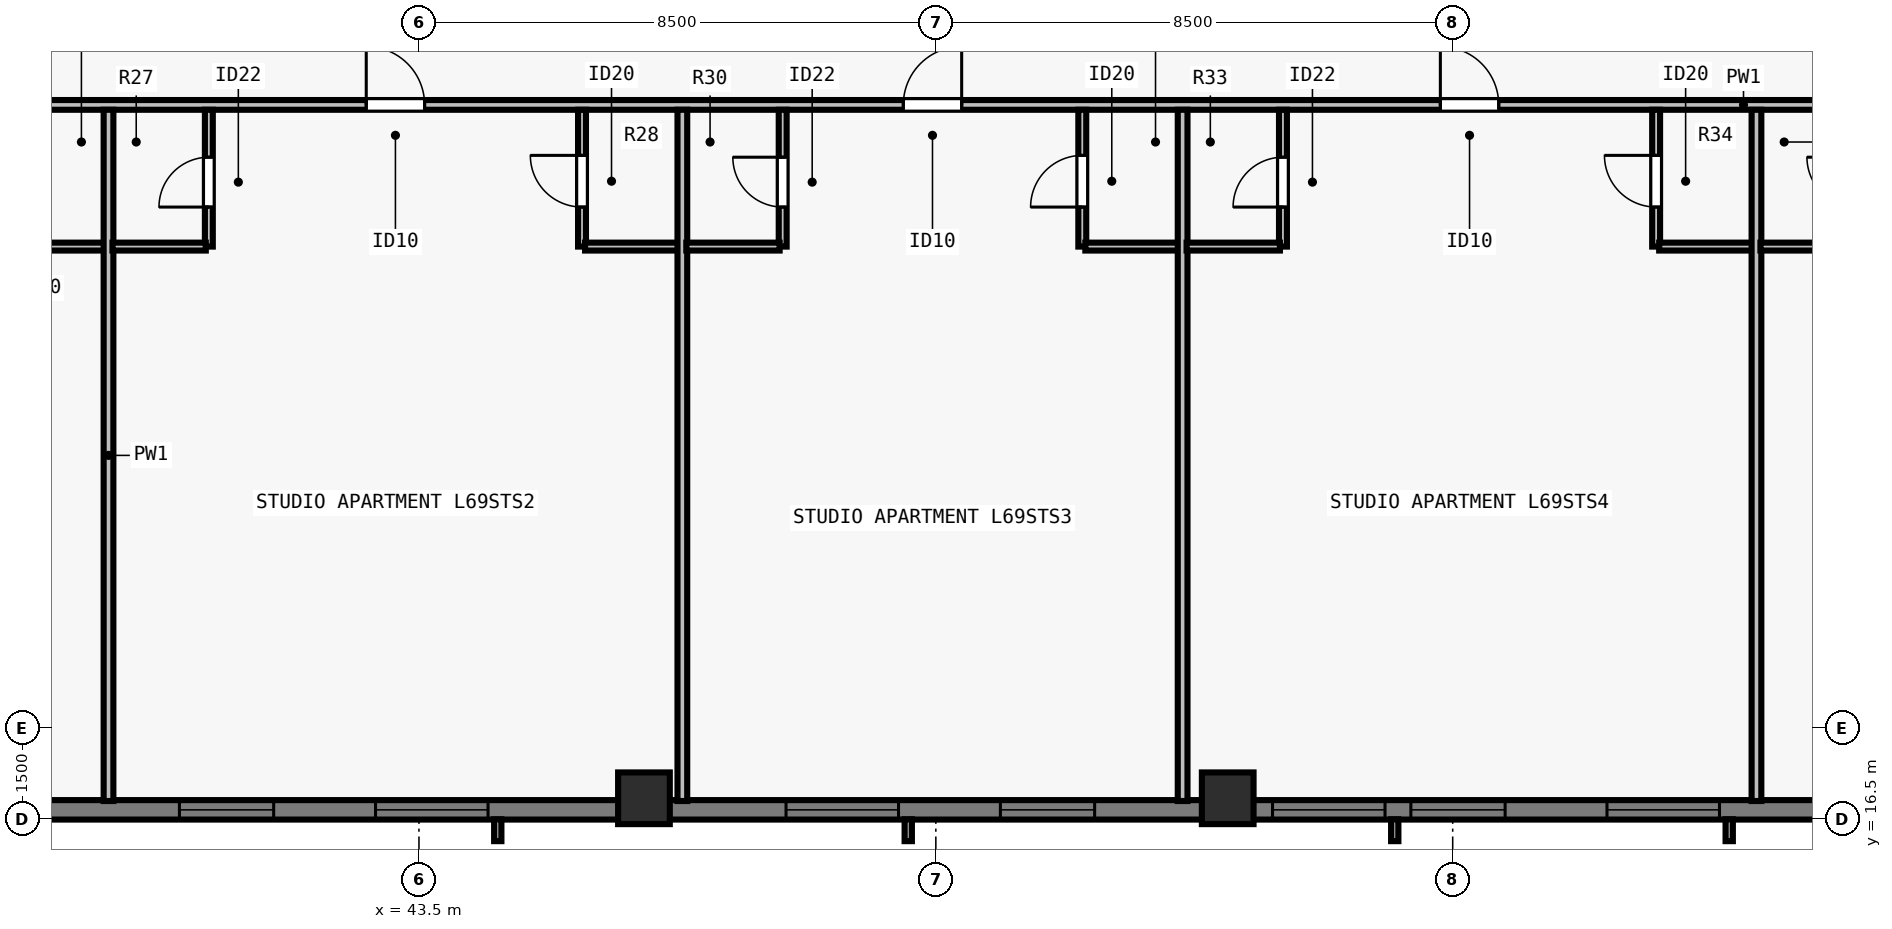
"""IFC4 building model, lengths in metres.
Left out: names, types, materials, properties, quantities, classifications, styles, units other than length and angle.
Written with IfcOpenShell. Run it as: python <this file> out.ifc"""

import sys

from ifc_helpers import new_model, si_unit, direction, frame, frame_2d, origin, origin_2d, place, context, subcontext, project, spatial, rectangle, extrude, element, fill, save


model = new_model("IFC4")
c1 = context("Model", 3, precision=1e-05, world=origin(), true_north=direction((0.0, 1.0)))
c2 = subcontext(c1, "Body", "Model", "MODEL_VIEW")
j1 = project(units=[si_unit("LENGTHUNIT", "METRE"), si_unit("PLANEANGLEUNIT", "RADIAN")], contexts=[c1])
p1 = place(None, origin())
s1 = spatial("IfcSite", under=j1, at=p1, CompositionType="ELEMENT")
p2 = place(p1, origin())
s2 = spatial("IfcBuilding", under=s1, at=p2, CompositionType="ELEMENT")
p3 = place(p2, frame((0.0, 0.0, 251.5)))
s3 = spatial("IfcBuildingStorey", under=s2, at=p3, CompositionType="ELEMENT", Elevation=251.5)
for number, where, z_axis, x_axis in (
    (1, (47.2, 16.85, 0.0), (0.0, 0.0, 1.0), (1.0, 0.0, 0.0)),
    (2, (56.8, 16.85, 0.0), (0.0, 0.0, 1.0), (1.0, 0.0, 0.0)),
):
    element("IfcColumn", number, at=place(p3, frame(where, z_axis=z_axis, x_axis=x_axis)), inside=s3, PredefinedType="COLUMN", context=c2, shape_type="SweptSolid", body=[
        extrude(rectangle(XDim=0.85, YDim=0.85, at=origin_2d()), origin(), (0.0, 0.0, 1.0), 3.5),
    ])
p4 = place(p3, frame((69.5, 16.66, 0.0), z_axis=(0.0, 0.0, 1.0), x_axis=(-1.0, 0.0, 0.0)))
e3 = element("IfcWall", 3, at=p4, inside=s3, PredefinedType="SOLIDWALL", context=c2, shape_type="SweptSolid", body=[
    extrude(rectangle(XDim=34.702, YDim=0.32, at=frame_2d((17.351, 0.0))), origin(), (0.0, 0.0, 1.0), 3.29),
])
p5 = place(p4, frame((4.613, 0.0, 0.8)))
e4 = element("IfcOpeningElement", 4, at=p5, cuts=e3, PredefinedType="OPENING", context=c2, shape_type="SweptSolid", body=[
    extrude(rectangle(XDim=1.85, YDim=1.678, at=frame_2d((0.925, 0.839))), frame((0.0, 0.17, 0.0), z_axis=(0.0, -1.0, 0.0), x_axis=(1.0, 0.0, 0.0)), (0.0, 0.0, 1.0), 0.34),
])
p6 = place(p4, frame((8.138, 0.0, 0.8)))
e5 = element("IfcOpeningElement", 5, at=p6, cuts=e3, PredefinedType="OPENING", context=c2, shape_type="SweptSolid", body=[
    extrude(rectangle(XDim=1.55, YDim=1.678, at=frame_2d((0.775, 0.839))), frame((0.0, 0.17, 0.0), z_axis=(0.0, -1.0, 0.0), x_axis=(1.0, 0.0, 0.0)), (0.0, 0.0, 1.0), 0.34),
])
p7 = place(p4, frame((10.113, 0.0, 0.8)))
e6 = element("IfcOpeningElement", 6, at=p7, cuts=e3, PredefinedType="OPENING", context=c2, shape_type="SweptSolid", body=[
    extrude(rectangle(XDim=1.85, YDim=1.678, at=frame_2d((0.925, 0.839))), frame((0.0, 0.17, 0.0), z_axis=(0.0, -1.0, 0.0), x_axis=(1.0, 0.0, 0.0)), (0.0, 0.0, 1.0), 0.34),
])
p8 = place(p4, frame((14.888, 0.0, 0.8)))
e7 = element("IfcOpeningElement", 7, at=p8, cuts=e3, PredefinedType="OPENING", context=c2, shape_type="SweptSolid", body=[
    extrude(rectangle(XDim=1.55, YDim=1.678, at=frame_2d((0.775, 0.839))), frame((0.0, 0.17, 0.0), z_axis=(0.0, -1.0, 0.0), x_axis=(1.0, 0.0, 0.0)), (0.0, 0.0, 1.0), 0.34),
])
p9 = place(p4, frame((18.114, 0.0, 0.8)))
e8 = element("IfcOpeningElement", 8, at=p9, cuts=e3, PredefinedType="OPENING", context=c2, shape_type="SweptSolid", body=[
    extrude(rectangle(XDim=1.85, YDim=1.678, at=frame_2d((0.925, 0.839))), frame((0.0, 0.17, 0.0), z_axis=(0.0, -1.0, 0.0), x_axis=(1.0, 0.0, 0.0)), (0.0, 0.0, 1.0), 0.34),
])
p10 = place(p4, frame((24.864, 0.0, 0.8)))
e9 = element("IfcOpeningElement", 9, at=p10, cuts=e3, PredefinedType="OPENING", context=c2, shape_type="SweptSolid", body=[
    extrude(rectangle(XDim=1.85, YDim=1.678, at=frame_2d((0.925, 0.839))), frame((0.0, 0.17, 0.0), z_axis=(0.0, -1.0, 0.0), x_axis=(1.0, 0.0, 0.0)), (0.0, 0.0, 1.0), 0.34),
])
p11 = place(p4, frame((28.389, 0.0, 0.8)))
e10 = element("IfcOpeningElement", 10, at=p11, cuts=e3, PredefinedType="OPENING", context=c2, shape_type="SweptSolid", body=[
    extrude(rectangle(XDim=1.55, YDim=1.678, at=frame_2d((0.775, 0.839))), frame((0.0, 0.17, 0.0), z_axis=(0.0, -1.0, 0.0), x_axis=(1.0, 0.0, 0.0)), (0.0, 0.0, 1.0), 0.34),
])
p12 = place(p3, frame((29.915, 28.252, 0.0), z_axis=(0.0, 0.0, 1.0), x_axis=(1.0, 0.0, 0.0)))
e11 = element("IfcWall", 11, at=p12, inside=s3, PredefinedType="PARTITIONING", context=c2, shape_type="SweptSolid", body=[
    extrude(rectangle(XDim=44.28, YDim=0.16, at=frame_2d((22.14, 0.0))), origin(), (0.0, 0.0, 1.0), 2.958),
])
p13 = place(p12, frame((5.002, 0.0, 0.0)))
e12 = element("IfcOpeningElement", 12, at=p13, cuts=e11, PredefinedType="OPENING", context=c2, shape_type="SweptSolid", body=[
    extrude(rectangle(XDim=0.96, YDim=2.18, at=frame_2d((0.48, 1.09))), frame((0.0, 0.09, 0.0), z_axis=(0.0, -1.0, 0.0), x_axis=(1.0, 0.0, 0.0)), (0.0, 0.0, 1.0), 0.18),
])
p14 = place(p12, frame((12.718, 0.0, 0.0)))
e13 = element("IfcOpeningElement", 13, at=p14, cuts=e11, PredefinedType="OPENING", context=c2, shape_type="SweptSolid", body=[
    extrude(rectangle(XDim=0.96, YDim=2.18, at=frame_2d((0.48, 1.09))), frame((0.0, 0.09, 0.0), z_axis=(0.0, -1.0, 0.0), x_axis=(1.0, 0.0, 0.0)), (0.0, 0.0, 1.0), 0.18),
])
p15 = place(p12, frame((21.55, 0.0, 0.0)))
e14 = element("IfcOpeningElement", 14, at=p15, cuts=e11, PredefinedType="OPENING", context=c2, shape_type="SweptSolid", body=[
    extrude(rectangle(XDim=0.96, YDim=2.18, at=frame_2d((0.48, 1.09))), frame((0.0, 0.09, 0.0), z_axis=(0.0, -1.0, 0.0), x_axis=(1.0, 0.0, 0.0)), (0.0, 0.0, 1.0), 0.18),
])
p16 = place(p12, frame((30.382, 0.0, 0.0)))
e15 = element("IfcOpeningElement", 15, at=p16, cuts=e11, PredefinedType="OPENING", context=c2, shape_type="SweptSolid", body=[
    extrude(rectangle(XDim=0.96, YDim=2.18, at=frame_2d((0.48, 1.09))), frame((0.0, 0.09, 0.0), z_axis=(0.0, -1.0, 0.0), x_axis=(1.0, 0.0, 0.0)), (0.0, 0.0, 1.0), 0.18),
])
p17 = place(p12, frame((39.393, 0.0, 0.0)))
e16 = element("IfcOpeningElement", 16, at=p17, cuts=e11, PredefinedType="OPENING", context=c2, shape_type="SweptSolid", body=[
    extrude(rectangle(XDim=0.96, YDim=2.18, at=frame_2d((0.48, 1.09))), frame((0.0, 0.09, 0.0), z_axis=(0.0, -1.0, 0.0), x_axis=(1.0, 0.0, 0.0)), (0.0, 0.0, 1.0), 0.18),
])
p18 = place(p3, frame((36.794, 25.923, 0.0), z_axis=(0.0, 0.0, 1.0), x_axis=(1.0, 0.0, 0.0)))
e17 = element("IfcWall", 17, at=p18, inside=s3, PredefinedType="PLUMBINGWALL", context=c2, shape_type="SweptSolid", body=[
    extrude(rectangle(XDim=1.6, YDim=0.13, at=frame_2d((0.8, 0.0))), origin(), (0.0, 0.0, 1.0), 3.29),
])
p19 = place(p3, frame((38.395, 16.805, 0.0), z_axis=(0.0, 0.0, 1.0), x_axis=(0.0, 1.0, 0.0)))
e18 = element("IfcWall", 18, at=p19, inside=s3, PredefinedType="PARTITIONING", context=c2, shape_type="SweptSolid", body=[
    extrude(rectangle(XDim=11.368, YDim=0.16, at=frame_2d((5.684, 0.0))), origin(), (0.0, 0.0, 1.0), 2.573),
])
p20 = place(p3, frame((40.044, 25.923, 0.0), z_axis=(0.0, 0.0, 1.0), x_axis=(0.0, 1.0, 0.0)))
e19 = element("IfcWall", 19, at=p20, inside=s3, PredefinedType="PLUMBINGWALL", context=c2, shape_type="SweptSolid", body=[
    extrude(rectangle(XDim=2.25, YDim=0.13, at=frame_2d((1.125, 0.0))), origin(), (0.0, 0.0, 1.0), 3.29),
])
p21 = place(p20, frame((0.65, 0.0, 0.0)))
e20 = element("IfcOpeningElement", 20, at=p21, cuts=e19, PredefinedType="OPENING", context=c2, shape_type="SweptSolid", body=[
    extrude(rectangle(XDim=0.82, YDim=2.1, at=frame_2d((0.41, 1.05))), frame((0.0, 0.075, 0.0), z_axis=(0.0, -1.0, 0.0), x_axis=(1.0, 0.0, 0.0)), (0.0, 0.0, 1.0), 0.15),
])
p22 = place(p3, frame((38.459, 25.923, 0.0), z_axis=(0.0, 0.0, 1.0), x_axis=(1.0, 0.0, 0.0)))
e21 = element("IfcWall", 21, at=p22, inside=s3, PredefinedType="PLUMBINGWALL", context=c2, shape_type="SweptSolid", body=[
    extrude(rectangle(XDim=1.535, YDim=0.13, at=frame_2d((0.768, 0.0))), origin(), (0.0, 0.0, 1.0), 3.29),
])
p23 = place(p3, frame((46.181, 25.923, 0.0), z_axis=(0.0, 0.0, 1.0), x_axis=(0.0, 1.0, 0.0)))
e22 = element("IfcWall", 22, at=p23, inside=s3, PredefinedType="PLUMBINGWALL", context=c2, shape_type="SweptSolid", body=[
    extrude(rectangle(XDim=2.25, YDim=0.13, at=frame_2d((1.125, 0.0))), origin(), (0.0, 0.0, 1.0), 3.29),
])
p24 = place(p23, frame((0.65, 0.0, 0.0)))
e23 = element("IfcOpeningElement", 23, at=p24, cuts=e22, PredefinedType="OPENING", context=c2, shape_type="SweptSolid", body=[
    extrude(rectangle(XDim=0.85, YDim=2.1, at=frame_2d((0.425, 1.05))), frame((0.0, 0.075, 0.0), z_axis=(0.0, -1.0, 0.0), x_axis=(1.0, 0.0, 0.0)), (0.0, 0.0, 1.0), 0.15),
])
p25 = place(p3, frame((46.231, 25.923, 0.0), z_axis=(0.0, 0.0, 1.0), x_axis=(1.0, 0.0, 0.0)))
e24 = element("IfcWall", 24, at=p25, inside=s3, PredefinedType="PLUMBINGWALL", context=c2, shape_type="SweptSolid", body=[
    extrude(rectangle(XDim=1.6, YDim=0.13, at=frame_2d((0.8, 0.0))), origin(), (0.0, 0.0, 1.0), 3.29),
])
p26 = place(p3, frame((47.832, 16.805, 0.0), z_axis=(0.0, 0.0, 1.0), x_axis=(0.0, 1.0, 0.0)))
e25 = element("IfcWall", 25, at=p26, inside=s3, PredefinedType="PARTITIONING", context=c2, shape_type="SweptSolid", body=[
    extrude(rectangle(XDim=11.368, YDim=0.16, at=frame_2d((5.684, 0.0))), origin(), (0.0, 0.0, 1.0), 2.958),
])
p27 = place(p3, frame((49.481, 25.923, 0.0), z_axis=(0.0, 0.0, 1.0), x_axis=(0.0, 1.0, 0.0)))
e26 = element("IfcWall", 26, at=p27, inside=s3, PredefinedType="PLUMBINGWALL", context=c2, shape_type="SweptSolid", body=[
    extrude(rectangle(XDim=2.25, YDim=0.13, at=frame_2d((1.125, 0.0))), origin(), (0.0, 0.0, 1.0), 3.29),
])
p28 = place(p27, frame((0.65, 0.0, 0.0)))
e27 = element("IfcOpeningElement", 27, at=p28, cuts=e26, PredefinedType="OPENING", context=c2, shape_type="SweptSolid", body=[
    extrude(rectangle(XDim=0.82, YDim=2.1, at=frame_2d((0.41, 1.05))), frame((0.0, 0.075, 0.0), z_axis=(0.0, -1.0, 0.0), x_axis=(1.0, 0.0, 0.0)), (0.0, 0.0, 1.0), 0.15),
])
p29 = place(p3, frame((47.896, 25.923, 0.0), z_axis=(0.0, 0.0, 1.0), x_axis=(1.0, 0.0, 0.0)))
e28 = element("IfcWall", 28, at=p29, inside=s3, PredefinedType="PLUMBINGWALL", context=c2, shape_type="SweptSolid", body=[
    extrude(rectangle(XDim=1.535, YDim=0.13, at=frame_2d((0.768, 0.0))), origin(), (0.0, 0.0, 1.0), 3.29),
])
p30 = place(p3, frame((54.408, 25.923, 0.0), z_axis=(0.0, 0.0, 1.0), x_axis=(0.0, 1.0, 0.0)))
e29 = element("IfcWall", 29, at=p30, inside=s3, PredefinedType="PLUMBINGWALL", context=c2, shape_type="SweptSolid", body=[
    extrude(rectangle(XDim=2.25, YDim=0.13, at=frame_2d((1.125, 0.0))), origin(), (0.0, 0.0, 1.0), 2.958),
])
p31 = place(p30, frame((0.65, 0.0, 0.0)))
e30 = element("IfcOpeningElement", 30, at=p31, cuts=e29, PredefinedType="OPENING", context=c2, shape_type="SweptSolid", body=[
    extrude(rectangle(XDim=0.85, YDim=2.1, at=frame_2d((0.425, 1.05))), frame((0.0, 0.075, 0.0), z_axis=(0.0, -1.0, 0.0), x_axis=(1.0, 0.0, 0.0)), (0.0, 0.0, 1.0), 0.15),
])
p32 = place(p3, frame((54.458, 25.923, 0.0), z_axis=(0.0, 0.0, 1.0), x_axis=(1.0, 0.0, 0.0)))
e31 = element("IfcWall", 31, at=p32, inside=s3, PredefinedType="PLUMBINGWALL", context=c2, shape_type="SweptSolid", body=[
    extrude(rectangle(XDim=1.6, YDim=0.13, at=frame_2d((0.8, 0.0))), origin(), (0.0, 0.0, 1.0), 3.29),
])
p33 = place(p3, frame((56.059, 16.805, 0.0), z_axis=(0.0, 0.0, 1.0), x_axis=(0.0, 1.0, 0.0)))
e32 = element("IfcWall", 32, at=p33, inside=s3, PredefinedType="PARTITIONING", context=c2, shape_type="SweptSolid", body=[
    extrude(rectangle(XDim=11.368, YDim=0.16, at=frame_2d((5.684, 0.0))), origin(), (0.0, 0.0, 1.0), 3.29),
])
p34 = place(p3, frame((57.708, 25.923, 0.0), z_axis=(0.0, 0.0, 1.0), x_axis=(0.0, 1.0, 0.0)))
e33 = element("IfcWall", 33, at=p34, inside=s3, PredefinedType="PLUMBINGWALL", context=c2, shape_type="SweptSolid", body=[
    extrude(rectangle(XDim=2.25, YDim=0.13, at=frame_2d((1.125, 0.0))), origin(), (0.0, 0.0, 1.0), 3.29),
])
p35 = place(p34, frame((0.65, 0.0, 0.0)))
e34 = element("IfcOpeningElement", 34, at=p35, cuts=e33, PredefinedType="OPENING", context=c2, shape_type="SweptSolid", body=[
    extrude(rectangle(XDim=0.82, YDim=2.1, at=frame_2d((0.41, 1.05))), frame((0.0, 0.075, 0.0), z_axis=(0.0, -1.0, 0.0), x_axis=(1.0, 0.0, 0.0)), (0.0, 0.0, 1.0), 0.15),
])
p36 = place(p3, frame((56.124, 25.923, 0.0), z_axis=(0.0, 0.0, 1.0), x_axis=(1.0, 0.0, 0.0)))
e35 = element("IfcWall", 35, at=p36, inside=s3, PredefinedType="PLUMBINGWALL", context=c2, shape_type="SweptSolid", body=[
    extrude(rectangle(XDim=1.535, YDim=0.13, at=frame_2d((0.768, 0.0))), origin(), (0.0, 0.0, 1.0), 3.29),
])
p37 = place(p3, frame((63.845, 25.923, 0.0), z_axis=(0.0, 0.0, 1.0), x_axis=(0.0, 1.0, 0.0)))
e36 = element("IfcWall", 36, at=p37, inside=s3, PredefinedType="PLUMBINGWALL", context=c2, shape_type="SweptSolid", body=[
    extrude(rectangle(XDim=2.25, YDim=0.13, at=frame_2d((1.125, 0.0))), origin(), (0.0, 0.0, 1.0), 3.29),
])
p38 = place(p37, frame((0.65, 0.0, 0.0)))
e37 = element("IfcOpeningElement", 37, at=p38, cuts=e36, PredefinedType="OPENING", context=c2, shape_type="SweptSolid", body=[
    extrude(rectangle(XDim=0.85, YDim=2.1, at=frame_2d((0.425, 1.05))), frame((0.0, 0.075, 0.0), z_axis=(0.0, -1.0, 0.0), x_axis=(1.0, 0.0, 0.0)), (0.0, 0.0, 1.0), 0.15),
])
p39 = place(p3, frame((63.896, 25.923, 0.0), z_axis=(0.0, 0.0, 1.0), x_axis=(1.0, 0.0, 0.0)))
e38 = element("IfcWall", 38, at=p39, inside=s3, PredefinedType="PLUMBINGWALL", context=c2, shape_type="SweptSolid", body=[
    extrude(rectangle(XDim=1.6, YDim=0.13, at=frame_2d((0.8, 0.0))), origin(), (0.0, 0.0, 1.0), 3.29),
])
p40 = place(p3, frame((65.496, 16.805, 0.0), z_axis=(0.0, 0.0, 1.0), x_axis=(0.0, 1.0, 0.0)))
e39 = element("IfcWall", 39, at=p40, inside=s3, PredefinedType="PARTITIONING", context=c2, shape_type="SweptSolid", body=[
    extrude(rectangle(XDim=11.368, YDim=0.16, at=frame_2d((5.684, 0.0))), origin(), (0.0, 0.0, 1.0), 2.573),
])
p41 = place(p3, frame((65.561, 25.923, 0.0), z_axis=(0.0, 0.0, 1.0), x_axis=(1.0, 0.0, 0.0)))
e40 = element("IfcWall", 40, at=p41, inside=s3, PredefinedType="PLUMBINGWALL", context=c2, shape_type="SweptSolid", body=[
    extrude(rectangle(XDim=1.535, YDim=0.13, at=frame_2d((0.768, 0.0))), origin(), (0.0, 0.0, 1.0), 3.29),
])
p42 = place(p5, origin())
e41 = element("IfcWindow", 41, at=p42, inside=s3, PartitioningType="SINGLE_PANEL", PredefinedType="WINDOW", context=c2, shape_type="SweptSolid", body=[
    extrude(rectangle(XDim=1.85, YDim=1.678, at=frame_2d((0.925, 0.839))), frame((0.0, -0.05, 0.0), z_axis=(0.0, -1.0, 0.0), x_axis=(1.0, 0.0, 0.0)), (0.0, 0.0, 1.0), 0.06),
])
fill(e4, e41)
p43 = place(p6, origin())
e42 = element("IfcWindow", 42, at=p43, inside=s3, PartitioningType="SINGLE_PANEL", PredefinedType="WINDOW", context=c2, shape_type="SweptSolid", body=[
    extrude(rectangle(XDim=1.55, YDim=1.678, at=frame_2d((0.775, 0.839))), frame((0.0, -0.05, 0.0), z_axis=(0.0, -1.0, 0.0), x_axis=(1.0, 0.0, 0.0)), (0.0, 0.0, 1.0), 0.06),
])
fill(e5, e42)
p44 = place(p7, origin())
e43 = element("IfcWindow", 43, at=p44, inside=s3, PartitioningType="SINGLE_PANEL", PredefinedType="WINDOW", context=c2, shape_type="SweptSolid", body=[
    extrude(rectangle(XDim=1.85, YDim=1.678, at=frame_2d((0.925, 0.839))), frame((0.0, -0.05, 0.0), z_axis=(0.0, -1.0, 0.0), x_axis=(1.0, 0.0, 0.0)), (0.0, 0.0, 1.0), 0.06),
])
fill(e6, e43)
p45 = place(p8, origin())
e44 = element("IfcWindow", 44, at=p45, inside=s3, PartitioningType="SINGLE_PANEL", PredefinedType="WINDOW", context=c2, shape_type="SweptSolid", body=[
    extrude(rectangle(XDim=1.55, YDim=1.678, at=frame_2d((0.775, 0.839))), frame((0.0, -0.05, 0.0), z_axis=(0.0, -1.0, 0.0), x_axis=(1.0, 0.0, 0.0)), (0.0, 0.0, 1.0), 0.06),
])
fill(e7, e44)
p46 = place(p9, origin())
e45 = element("IfcWindow", 45, at=p46, inside=s3, PartitioningType="SINGLE_PANEL", PredefinedType="WINDOW", context=c2, shape_type="SweptSolid", body=[
    extrude(rectangle(XDim=1.85, YDim=1.678, at=frame_2d((0.925, 0.839))), frame((0.0, -0.05, 0.0), z_axis=(0.0, -1.0, 0.0), x_axis=(1.0, 0.0, 0.0)), (0.0, 0.0, 1.0), 0.06),
])
fill(e8, e45)
p47 = place(p10, origin())
e46 = element("IfcWindow", 46, at=p47, inside=s3, PartitioningType="SINGLE_PANEL", PredefinedType="WINDOW", context=c2, shape_type="SweptSolid", body=[
    extrude(rectangle(XDim=1.85, YDim=1.678, at=frame_2d((0.925, 0.839))), frame((0.0, -0.05, 0.0), z_axis=(0.0, -1.0, 0.0), x_axis=(1.0, 0.0, 0.0)), (0.0, 0.0, 1.0), 0.06),
])
fill(e9, e46)
p48 = place(p11, origin())
e47 = element("IfcWindow", 47, at=p48, inside=s3, PartitioningType="SINGLE_PANEL", PredefinedType="WINDOW", context=c2, shape_type="SweptSolid", body=[
    extrude(rectangle(XDim=1.55, YDim=1.678, at=frame_2d((0.775, 0.839))), frame((0.0, -0.05, 0.0), z_axis=(0.0, -1.0, 0.0), x_axis=(1.0, 0.0, 0.0)), (0.0, 0.0, 1.0), 0.06),
])
fill(e10, e47)
p49 = place(p21, origin())
e48 = element("IfcDoor", 48, at=p49, inside=s3, OperationType="SINGLE_SWING_LEFT", PredefinedType="DOOR", context=c2, shape_type="SweptSolid", body=[
    extrude(rectangle(XDim=0.82, YDim=2.1, at=frame_2d((0.41, 1.05))), frame((0.0, 0.025, 0.0), z_axis=(0.0, -1.0, 0.0), x_axis=(1.0, 0.0, 0.0)), (0.0, 0.0, 1.0), 0.05),
])
fill(e20, e48)
p50 = place(p24, origin())
e49 = element("IfcDoor", 49, at=p50, inside=s3, OperationType="SINGLE_SWING_RIGHT", PredefinedType="DOOR", context=c2, shape_type="SweptSolid", body=[
    extrude(rectangle(XDim=0.85, YDim=2.1, at=frame_2d((0.425, 1.05))), frame((0.0, 0.025, 0.0), z_axis=(0.0, -1.0, 0.0), x_axis=(1.0, 0.0, 0.0)), (0.0, 0.0, 1.0), 0.05),
])
fill(e23, e49)
p51 = place(p14, origin())
e50 = element("IfcDoor", 50, at=p51, inside=s3, OperationType="SINGLE_SWING_LEFT", PredefinedType="DOOR", context=c2, shape_type="SweptSolid", body=[
    extrude(rectangle(XDim=0.96, YDim=2.18, at=frame_2d((0.48, 1.09))), frame((0.0, 0.025, 0.0), z_axis=(0.0, -1.0, 0.0), x_axis=(1.0, 0.0, 0.0)), (0.0, 0.0, 1.0), 0.05),
])
fill(e13, e50)
p52 = place(p28, origin())
e51 = element("IfcDoor", 51, at=p52, inside=s3, OperationType="SINGLE_SWING_RIGHT", PredefinedType="DOOR", context=c2, shape_type="SweptSolid", body=[
    extrude(rectangle(XDim=0.82, YDim=2.1, at=frame_2d((0.41, 1.05))), frame((0.0, 0.025, 0.0), z_axis=(0.0, -1.0, 0.0), x_axis=(1.0, 0.0, 0.0)), (0.0, 0.0, 1.0), 0.05),
])
fill(e27, e51)
p53 = place(p31, origin())
e52 = element("IfcDoor", 52, at=p53, inside=s3, OperationType="SINGLE_SWING_LEFT", PredefinedType="DOOR", context=c2, shape_type="SweptSolid", body=[
    extrude(rectangle(XDim=0.85, YDim=2.1, at=frame_2d((0.425, 1.05))), frame((0.0, 0.025, 0.0), z_axis=(0.0, -1.0, 0.0), x_axis=(1.0, 0.0, 0.0)), (0.0, 0.0, 1.0), 0.05),
])
fill(e30, e52)
p54 = place(p15, origin())
e53 = element("IfcDoor", 53, at=p54, inside=s3, OperationType="SINGLE_SWING_RIGHT", PredefinedType="DOOR", context=c2, shape_type="SweptSolid", body=[
    extrude(rectangle(XDim=0.96, YDim=2.18, at=frame_2d((0.48, 1.09))), frame((0.0, 0.025, 0.0), z_axis=(0.0, -1.0, 0.0), x_axis=(1.0, 0.0, 0.0)), (0.0, 0.0, 1.0), 0.05),
])
fill(e14, e53)
p55 = place(p35, origin())
e54 = element("IfcDoor", 54, at=p55, inside=s3, OperationType="SINGLE_SWING_LEFT", PredefinedType="DOOR", context=c2, shape_type="SweptSolid", body=[
    extrude(rectangle(XDim=0.82, YDim=2.1, at=frame_2d((0.41, 1.05))), frame((0.0, 0.025, 0.0), z_axis=(0.0, -1.0, 0.0), x_axis=(1.0, 0.0, 0.0)), (0.0, 0.0, 1.0), 0.05),
])
fill(e34, e54)
p56 = place(p38, origin())
e55 = element("IfcDoor", 55, at=p56, inside=s3, OperationType="SINGLE_SWING_RIGHT", PredefinedType="DOOR", context=c2, shape_type="SweptSolid", body=[
    extrude(rectangle(XDim=0.85, YDim=2.1, at=frame_2d((0.425, 1.05))), frame((0.0, 0.025, 0.0), z_axis=(0.0, -1.0, 0.0), x_axis=(1.0, 0.0, 0.0)), (0.0, 0.0, 1.0), 0.05),
])
fill(e37, e55)
p57 = place(p16, origin())
e56 = element("IfcDoor", 56, at=p57, inside=s3, OperationType="SINGLE_SWING_LEFT", PredefinedType="DOOR", context=c2, shape_type="SweptSolid", body=[
    extrude(rectangle(XDim=0.96, YDim=2.18, at=frame_2d((0.48, 1.09))), frame((0.0, 0.025, 0.0), z_axis=(0.0, -1.0, 0.0), x_axis=(1.0, 0.0, 0.0)), (0.0, 0.0, 1.0), 0.05),
])
fill(e15, e56)
save(model, sys.argv[1])
